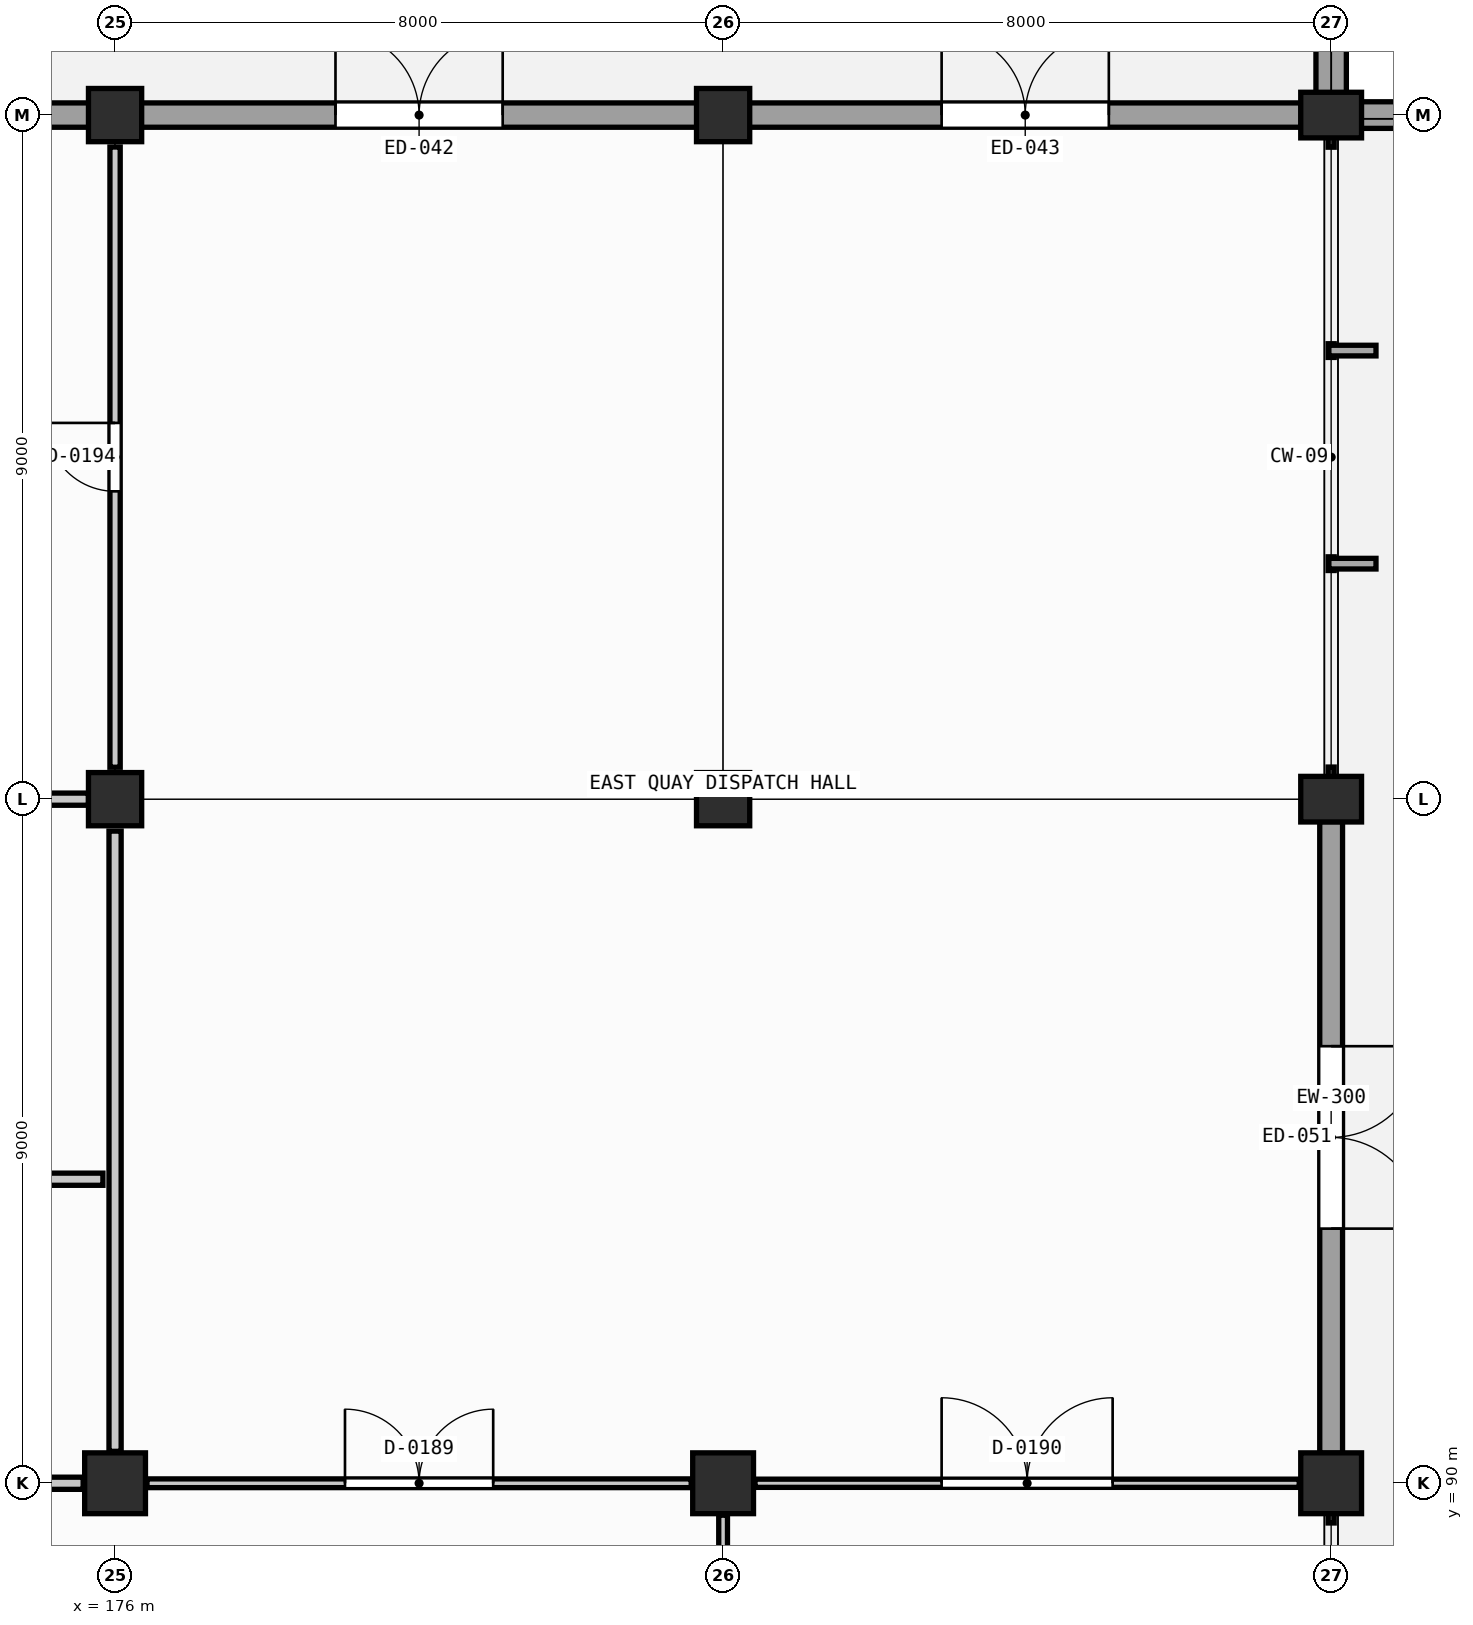
"""IFC4 building model, lengths in metres.
Left out: names, types, materials, properties, quantities, classifications, styles, units other than length and angle.
Written with IfcOpenShell. Run it as: python <this file> out.ifc"""

import sys

from ifc_helpers import new_model, si_unit, direction, frame, frame_2d, origin, origin_2d, place, context, subcontext, project, spatial, rectangle, extrude, element, fill, save


model = new_model("IFC4")
c1 = context("Model", 3, precision=1e-05, world=origin(), true_north=direction((0.0, 1.0)))
c2 = subcontext(c1, "Body", "Model", "MODEL_VIEW")
j1 = project(units=[si_unit("LENGTHUNIT", "METRE"), si_unit("PLANEANGLEUNIT", "RADIAN")], contexts=[c1])
p1 = place(None, origin())
s1 = spatial("IfcSite", under=j1, at=p1, CompositionType="ELEMENT")
p2 = place(p1, origin())
s2 = spatial("IfcBuilding", under=s1, at=p2, CompositionType="ELEMENT")
p3 = place(p2, origin())
s3 = spatial("IfcBuildingStorey", under=s2, at=p3, CompositionType="ELEMENT", Elevation=0.0)
p4 = place(p3, frame((192.0, 108.0, -1.25), z_axis=(0.0, 0.0, 1.0), x_axis=(0.0, 1.0, 0.0)))
e1 = element("IfcWall", 1, at=p4, inside=s3, PredefinedType="STANDARD", context=c2, shape_type="SweptSolid", body=[
    extrude(rectangle(XDim=9.0, YDim=0.4, at=frame_2d((4.5, 0.0))), origin(), (0.0, 0.0, 1.0), 0.97),
])
p5 = place(p3, frame((192.0, 108.0, -1.25), z_axis=(0.0, 0.0, 1.0), x_axis=(1.0, 0.0, 0.0)))
e2 = element("IfcWall", 2, at=p5, inside=s3, PredefinedType="STANDARD", context=c2, shape_type="SweptSolid", body=[
    extrude(rectangle(XDim=3.2, YDim=0.35, at=frame_2d((1.6, 0.0))), origin(), (0.0, 0.0, 1.0), 0.97),
])
p6 = place(p3, frame((176.0, 90.0, -1.25), z_axis=(0.0, 0.0, 1.0), x_axis=(1.0, 0.0, 0.0)))
e3 = element("IfcColumn", 3, at=p6, inside=s3, PredefinedType="COLUMN", context=c2, shape_type="SweptSolid", body=[
    extrude(rectangle(XDim=0.8, YDim=0.8, at=origin_2d()), origin(), (0.0, 0.0, 1.0), 6.05),
])
for number, where, z_axis, x_axis in (
    (4, (176.0, 99.0, -1.25), (0.0, 0.0, 1.0), (1.0, 0.0, 0.0)),
    (5, (176.0, 108.0, -1.25), (0.0, 0.0, 1.0), (1.0, 0.0, 0.0)),
):
    element("IfcColumn", number, at=place(p3, frame(where, z_axis=z_axis, x_axis=x_axis)), inside=s3, PredefinedType="COLUMN", context=c2, shape_type="SweptSolid", body=[
        extrude(rectangle(XDim=0.7, YDim=0.7, at=origin_2d()), origin(), (0.0, 0.0, 1.0), 6.05),
    ])
p7 = place(p3, frame((184.0, 90.0, -1.25), z_axis=(0.0, 0.0, 1.0), x_axis=(1.0, 0.0, 0.0)))
e6 = element("IfcColumn", 6, at=p7, inside=s3, PredefinedType="COLUMN", context=c2, shape_type="SweptSolid", body=[
    extrude(rectangle(XDim=0.8, YDim=0.8, at=origin_2d()), origin(), (0.0, 0.0, 1.0), 6.05),
])
for number, where, z_axis, x_axis in (
    (7, (184.0, 99.0, -1.25), (0.0, 0.0, 1.0), (1.0, 0.0, 0.0)),
    (8, (184.0, 108.0, -1.25), (0.0, 0.0, 1.0), (1.0, 0.0, 0.0)),
):
    element("IfcColumn", number, at=place(p3, frame(where, z_axis=z_axis, x_axis=x_axis)), inside=s3, PredefinedType="COLUMN", context=c2, shape_type="SweptSolid", body=[
        extrude(rectangle(XDim=0.7, YDim=0.7, at=origin_2d()), origin(), (0.0, 0.0, 1.0), 6.05),
    ])
p8 = place(p3, frame((192.0, 90.0, -1.25), z_axis=(0.0, 0.0, 1.0), x_axis=(1.0, 0.0, 0.0)))
e9 = element("IfcColumn", 9, at=p8, inside=s3, PredefinedType="COLUMN", context=c2, shape_type="SweptSolid", body=[
    extrude(rectangle(XDim=0.8, YDim=0.8, at=origin_2d()), origin(), (0.0, 0.0, 1.0), 6.05),
])
for number, where, z_axis, x_axis in (
    (10, (192.0, 99.0, -1.25), (0.0, 0.0, 1.0), (1.0, 0.0, 0.0)),
    (11, (192.0, 108.0, -1.25), (0.0, 0.0, 1.0), (1.0, 0.0, 0.0)),
):
    element("IfcColumn", number, at=place(p3, frame(where, z_axis=z_axis, x_axis=x_axis)), inside=s3, PredefinedType="COLUMN", context=c2, shape_type="SweptSolid", body=[
        extrude(rectangle(XDim=0.8, YDim=0.6, at=origin_2d()), origin(), (0.0, 0.0, 1.0), 6.05),
    ])
p9 = place(p3, frame((175.655, 108.0, 0.0), z_axis=(0.0, 0.0, 1.0), x_axis=(-1.0, 0.0, 0.0)))
e12 = element("IfcWall", 12, at=p9, inside=s3, PredefinedType="SOLIDWALL", context=c2, shape_type="SweptSolid", body=[
    extrude(rectangle(XDim=7.31, YDim=0.32, at=frame_2d((3.655, 0.0))), origin(), (0.0, 0.0, 1.0), 3.65),
])
p10 = place(p3, frame((183.655, 108.0, 0.0), z_axis=(0.0, 0.0, 1.0), x_axis=(-1.0, 0.0, 0.0)))
e13 = element("IfcWall", 13, at=p10, inside=s3, PredefinedType="SOLIDWALL", context=c2, shape_type="SweptSolid", body=[
    extrude(rectangle(XDim=7.31, YDim=0.32, at=frame_2d((3.655, 0.0))), origin(), (0.0, 0.0, 1.0), 3.65),
])
p11 = place(p10, frame((2.555, 0.0, 0.0)))
e14 = element("IfcOpeningElement", 14, at=p11, cuts=e13, PredefinedType="OPENING", context=c2, shape_type="SweptSolid", body=[
    extrude(rectangle(XDim=2.2, YDim=2.3, at=frame_2d((1.1, 1.15))), frame((0.0, 0.17, 0.0), z_axis=(0.0, -1.0, 0.0), x_axis=(1.0, 0.0, 0.0)), (0.0, 0.0, 1.0), 0.34),
])
p12 = place(p3, frame((191.605, 108.0, 0.0), z_axis=(0.0, 0.0, 1.0), x_axis=(-1.0, 0.0, 0.0)))
e15 = element("IfcWall", 15, at=p12, inside=s3, PredefinedType="SOLIDWALL", context=c2, shape_type="SweptSolid", body=[
    extrude(rectangle(XDim=7.26, YDim=0.32, at=frame_2d((3.63, 0.0))), origin(), (0.0, 0.0, 1.0), 3.65),
])
p13 = place(p12, frame((2.53, 0.0, 0.0)))
e16 = element("IfcOpeningElement", 16, at=p13, cuts=e15, PredefinedType="OPENING", context=c2, shape_type="SweptSolid", body=[
    extrude(rectangle(XDim=2.2, YDim=2.3, at=frame_2d((1.1, 1.15))), frame((0.0, 0.17, 0.0), z_axis=(0.0, -1.0, 0.0), x_axis=(1.0, 0.0, 0.0)), (0.0, 0.0, 1.0), 0.34),
])
p14 = place(p3, frame((192.0, 90.395, 0.0), z_axis=(0.0, 0.0, 1.0), x_axis=(0.0, 1.0, 0.0)))
e17 = element("IfcWall", 17, at=p14, inside=s3, PredefinedType="SOLIDWALL", context=c2, shape_type="SweptSolid", body=[
    extrude(rectangle(XDim=8.31, YDim=0.3, at=frame_2d((4.155, 0.0))), origin(), (0.0, 0.0, 1.0), 3.65),
])
p15 = place(p14, frame((2.955, 0.0, 0.0)))
e18 = element("IfcOpeningElement", 18, at=p15, cuts=e17, PredefinedType="OPENING", context=c2, shape_type="SweptSolid", body=[
    extrude(rectangle(XDim=2.4, YDim=2.3, at=frame_2d((1.2, 1.15))), frame((0.0, 0.16, 0.0), z_axis=(0.0, -1.0, 0.0), x_axis=(1.0, 0.0, 0.0)), (0.0, 0.0, 1.0), 0.32),
])
p16 = place(p3, frame((176.0, 90.42, 0.0), z_axis=(0.0, 0.0, 1.0), x_axis=(0.0, 1.0, 0.0)))
e19 = element("IfcWall", 19, at=p16, inside=s3, PredefinedType="PARTITIONING", context=c2, shape_type="SweptSolid", body=[
    extrude(rectangle(XDim=8.16, YDim=0.16, at=frame_2d((4.08, 0.0))), origin(), (0.0, 0.0, 1.0), 3.65),
])
p17 = place(p3, frame((168.42, 90.0, 0.0), z_axis=(0.0, 0.0, 1.0), x_axis=(1.0, 0.0, 0.0)))
e20 = element("IfcWall", 20, at=p17, inside=s3, PredefinedType="PARTITIONING", context=c2, shape_type="SweptSolid", body=[
    extrude(rectangle(XDim=7.16, YDim=0.16, at=frame_2d((3.58, 0.0))), origin(), (0.0, 0.0, 1.0), 3.65),
])
p18 = place(p3, frame((168.16, 94.0, 0.0), z_axis=(0.0, 0.0, 1.0), x_axis=(1.0, 0.0, 0.0)))
e21 = element("IfcWall", 21, at=p18, inside=s3, PredefinedType="PARTITIONING", context=c2, shape_type="SweptSolid", body=[
    extrude(rectangle(XDim=7.68, YDim=0.16, at=frame_2d((3.84, 0.0))), origin(), (0.0, 0.0, 1.0), 3.65),
])
p19 = place(p18, frame((0.45, 0.0, 0.0)))
e22 = element("IfcOpeningElement", 22, at=p19, cuts=e21, PredefinedType="OPENING", context=c2, shape_type="SweptSolid", body=[
    extrude(rectangle(XDim=1.05, YDim=2.1, at=frame_2d((0.525, 1.05))), frame((0.0, 0.09, 0.0), z_axis=(0.0, -1.0, 0.0), x_axis=(1.0, 0.0, 0.0)), (0.0, 0.0, 1.0), 0.18),
])
p20 = place(p18, frame((2.95, 0.0, 0.0)))
e23 = element("IfcOpeningElement", 23, at=p20, cuts=e21, PredefinedType="OPENING", context=c2, shape_type="SweptSolid", body=[
    extrude(rectangle(XDim=1.0, YDim=2.15, at=frame_2d((0.5, 1.075))), frame((0.0, 0.09, 0.0), z_axis=(0.0, -1.0, 0.0), x_axis=(1.0, 0.0, 0.0)), (0.0, 0.0, 1.0), 0.18),
])
p21 = place(p18, frame((5.35, 0.0, 0.0)))
e24 = element("IfcOpeningElement", 24, at=p21, cuts=e21, PredefinedType="OPENING", context=c2, shape_type="SweptSolid", body=[
    extrude(rectangle(XDim=1.1, YDim=2.15, at=frame_2d((0.55, 1.075))), frame((0.0, 0.09, 0.0), z_axis=(0.0, -1.0, 0.0), x_axis=(1.0, 0.0, 0.0)), (0.0, 0.0, 1.0), 0.18),
])
p22 = place(p3, frame((168.35, 99.0, 0.0), z_axis=(0.0, 0.0, 1.0), x_axis=(1.0, 0.0, 0.0)))
e25 = element("IfcWall", 25, at=p22, inside=s3, PredefinedType="PARTITIONING", context=c2, shape_type="SweptSolid", body=[
    extrude(rectangle(XDim=7.3, YDim=0.16, at=frame_2d((3.65, 0.0))), origin(), (0.0, 0.0, 1.0), 3.65),
])
p23 = place(p3, frame((184.0, 78.42, 0.0), z_axis=(0.0, 0.0, 1.0), x_axis=(0.0, 1.0, 0.0)))
e26 = element("IfcWall", 26, at=p23, inside=s3, PredefinedType="PARTITIONING", context=c2, shape_type="SweptSolid", body=[
    extrude(rectangle(XDim=11.16, YDim=0.115, at=frame_2d((5.58, 0.0))), origin(), (0.0, 0.0, 1.0), 3.65),
])
p24 = place(p3, frame((176.42, 90.0, 0.0), z_axis=(0.0, 0.0, 1.0), x_axis=(1.0, 0.0, 0.0)))
e27 = element("IfcWall", 27, at=p24, inside=s3, PredefinedType="PARTITIONING", context=c2, shape_type="SweptSolid", body=[
    extrude(rectangle(XDim=7.16, YDim=0.115, at=frame_2d((3.58, 0.0))), origin(), (0.0, 0.0, 1.0), 3.65),
])
p25 = place(p24, frame((2.605, 0.0, 0.0)))
e28 = element("IfcOpeningElement", 28, at=p25, cuts=e27, PredefinedType="OPENING", context=c2, shape_type="SweptSolid", body=[
    extrude(rectangle(XDim=1.95, YDim=2.3, at=frame_2d((0.975, 1.15))), frame((0.0, 0.067, 0.0), z_axis=(0.0, -1.0, 0.0), x_axis=(1.0, 0.0, 0.0)), (0.0, 0.0, 1.0), 0.135),
])
p26 = place(p3, frame((184.42, 90.0, 0.0), z_axis=(0.0, 0.0, 1.0), x_axis=(1.0, 0.0, 0.0)))
e29 = element("IfcWall", 29, at=p26, inside=s3, PredefinedType="PARTITIONING", context=c2, shape_type="SweptSolid", body=[
    extrude(rectangle(XDim=7.16, YDim=0.108, at=frame_2d((3.58, 0.0))), origin(), (0.0, 0.0, 1.0), 3.65),
])
p27 = place(p26, frame((2.455, 0.0, 0.0)))
e30 = element("IfcOpeningElement", 30, at=p27, cuts=e29, PredefinedType="OPENING", context=c2, shape_type="SweptSolid", body=[
    extrude(rectangle(XDim=2.25, YDim=2.38, at=frame_2d((1.125, 1.19))), frame((0.0, 0.064, 0.0), z_axis=(0.0, -1.0, 0.0), x_axis=(1.0, 0.0, 0.0)), (0.0, 0.0, 1.0), 0.128),
])
p28 = place(p3, frame((176.0, 99.42, 0.0), z_axis=(0.0, 0.0, 1.0), x_axis=(0.0, 1.0, 0.0)))
e31 = element("IfcWall", 31, at=p28, inside=s3, PredefinedType="PLUMBINGWALL", context=c2, shape_type="SweptSolid", body=[
    extrude(rectangle(XDim=8.16, YDim=0.135, at=frame_2d((4.08, 0.0))), origin(), (0.0, 0.0, 1.0), 3.65),
])
p29 = place(p28, frame((3.63, 0.0, 0.0)))
e32 = element("IfcOpeningElement", 32, at=p29, cuts=e31, PredefinedType="OPENING", context=c2, shape_type="SweptSolid", body=[
    extrude(rectangle(XDim=0.9, YDim=2.06, at=frame_2d((0.45, 1.03))), frame((0.0, 0.078, 0.0), z_axis=(0.0, -1.0, 0.0), x_axis=(1.0, 0.0, 0.0)), (0.0, 0.0, 1.0), 0.155),
])
p30 = place(p11, frame((2.2, 0.0, 0.0), z_axis=(0.0, 0.0, 1.0), x_axis=(-1.0, 0.0, 0.0)))
e33 = element("IfcDoor", 33, at=p30, inside=s3, OperationType="DOUBLE_DOOR_SINGLE_SWING", PredefinedType="DOOR", context=c2, shape_type="SweptSolid", body=[
    extrude(rectangle(XDim=2.2, YDim=2.3, at=frame_2d((1.1, 1.15))), frame((0.0, 0.025, 0.0), z_axis=(0.0, -1.0, 0.0), x_axis=(1.0, 0.0, 0.0)), (0.0, 0.0, 1.0), 0.05),
])
fill(e14, e33)
p31 = place(p13, frame((2.2, 0.0, 0.0), z_axis=(0.0, 0.0, 1.0), x_axis=(-1.0, 0.0, 0.0)))
e34 = element("IfcDoor", 34, at=p31, inside=s3, OperationType="DOUBLE_DOOR_SINGLE_SWING", PredefinedType="DOOR", context=c2, shape_type="SweptSolid", body=[
    extrude(rectangle(XDim=2.2, YDim=2.3, at=frame_2d((1.1, 1.15))), frame((0.0, 0.025, 0.0), z_axis=(0.0, -1.0, 0.0), x_axis=(1.0, 0.0, 0.0)), (0.0, 0.0, 1.0), 0.05),
])
fill(e16, e34)
p32 = place(p15, frame((2.4, 0.0, 0.0), z_axis=(0.0, 0.0, 1.0), x_axis=(-1.0, 0.0, 0.0)))
e35 = element("IfcDoor", 35, at=p32, inside=s3, OperationType="DOUBLE_DOOR_SINGLE_SWING", PredefinedType="DOOR", context=c2, shape_type="SweptSolid", body=[
    extrude(rectangle(XDim=2.4, YDim=2.3, at=frame_2d((1.2, 1.15))), frame((0.0, 0.025, 0.0), z_axis=(0.0, -1.0, 0.0), x_axis=(1.0, 0.0, 0.0)), (0.0, 0.0, 1.0), 0.05),
])
fill(e18, e35)
p33 = place(p25, origin())
e36 = element("IfcDoor", 36, at=p33, inside=s3, OperationType="DOUBLE_DOOR_SINGLE_SWING", PredefinedType="DOOR", context=c2, shape_type="SweptSolid", body=[
    extrude(rectangle(XDim=1.95, YDim=2.3, at=frame_2d((0.975, 1.15))), frame((0.0, 0.025, 0.0), z_axis=(0.0, -1.0, 0.0), x_axis=(1.0, 0.0, 0.0)), (0.0, 0.0, 1.0), 0.05),
])
fill(e28, e36)
p34 = place(p27, origin())
e37 = element("IfcDoor", 37, at=p34, inside=s3, OperationType="DOUBLE_DOOR_SINGLE_SWING", PredefinedType="DOOR", context=c2, shape_type="SweptSolid", body=[
    extrude(rectangle(XDim=2.25, YDim=2.38, at=frame_2d((1.125, 1.19))), frame((0.0, 0.025, 0.0), z_axis=(0.0, -1.0, 0.0), x_axis=(1.0, 0.0, 0.0)), (0.0, 0.0, 1.0), 0.05),
])
fill(e30, e37)
p35 = place(p29, origin())
e38 = element("IfcDoor", 38, at=p35, inside=s3, OperationType="SINGLE_SWING_RIGHT", PredefinedType="DOOR", context=c2, shape_type="SweptSolid", body=[
    extrude(rectangle(XDim=0.9, YDim=2.06, at=frame_2d((0.45, 1.03))), frame((0.0, 0.025, 0.0), z_axis=(0.0, -1.0, 0.0), x_axis=(1.0, 0.0, 0.0)), (0.0, 0.0, 1.0), 0.05),
])
fill(e32, e38)
save(model, sys.argv[1])
